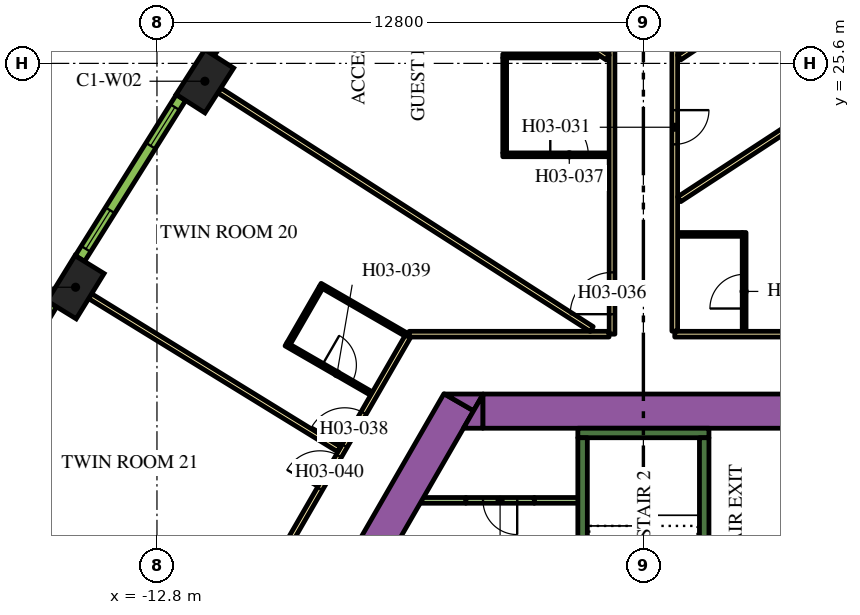
"""IFC4 building model, lengths in metres.
Left out: names, types, materials, properties, quantities, classifications, styles, units other than length and angle.
Written with IfcOpenShell. Run it as: python <this file> out.ifc"""

import sys

from ifc_helpers import new_model, si_unit, direction, frame, frame_2d, origin, origin_2d, place, context, subcontext, project, spatial, polyline, rectangle, outline, extrude, element, fill, save


model = new_model("IFC4")
c1 = context("Model", 3, precision=1e-05, world=origin(), true_north=direction((0.0, 1.0)))
c2 = subcontext(c1, "Body", "Model", "MODEL_VIEW")
j1 = project(units=[si_unit("LENGTHUNIT", "METRE"), si_unit("PLANEANGLEUNIT", "RADIAN")], contexts=[c1])
p1 = place(None, origin())
s1 = spatial("IfcSite", under=j1, at=p1, CompositionType="ELEMENT")
p2 = place(p1, origin())
s2 = spatial("IfcBuilding", under=s1, at=p2, CompositionType="ELEMENT")
p3 = place(p2, frame((0.0, 0.0, 54.9)))
s3 = spatial("IfcBuildingStorey", under=s2, at=p3, CompositionType="ELEMENT", Elevation=54.9)
for number, where, z_axis, x_axis in (
    (1, (-11.539, 25.131, 0.0), (0.0, 0.0, 1.0), (-0.539, -0.842, 0.0)),
    (2, (-14.942, 19.71, 0.0), (0.0, 0.0, 1.0), (-0.524, -0.852, 0.0)),
):
    element("IfcColumn", number, at=place(p3, frame(where, z_axis=z_axis, x_axis=x_axis)), inside=s3, PredefinedType="COLUMN", context=c2, shape_type="SweptSolid", body=[
        extrude(rectangle(XDim=1.4, YDim=0.9, at=origin_2d()), origin(), (0.0, 0.0, 1.0), 3.9),
    ])
p4 = place(p3, frame((-14.268, 0.387, 0.0), z_axis=(0.0, 0.0, 1.0), x_axis=(0.499994617707, 0.866028511231, 0.0)))
e3 = element("IfcWall", 3, at=p4, inside=s3, PredefinedType="SOLIDWALL", context=c2, shape_type="SweptSolid", body=[
    extrude(rectangle(XDim=18.817, YDim=0.9, at=frame_2d((9.409, 0.0))), origin(), (0.0, 0.0, 1.0), 3.9),
])
p5 = place(p3, origin())
e4 = element("IfcWall", 4, at=p5, inside=s3, PredefinedType="SOLIDWALL", context=c2, shape_type="SweptSolid", body=[
    extrude(outline(polyline([(-4.215, 16.9), (-4.469, 16.46), (-5.231, 16.9), (-4.215, 16.9)])), origin(), (0.0, 0.0, 1.0), 3.9),
])
p6 = place(p3, frame((-4.224, 16.45, 0.0), z_axis=(0.0, 0.0, 1.0), x_axis=(1.0, 0.0, 0.0)))
e5 = element("IfcWall", 5, at=p6, inside=s3, PredefinedType="SOLIDWALL", context=c2, shape_type="SweptSolid", body=[
    extrude(rectangle(XDim=9.488, YDim=0.9, at=frame_2d((4.744, 0.0))), origin(), (0.0, 0.0, 1.0), 3.9),
])
e6 = element("IfcWall", 6, at=p5, inside=s3, PredefinedType="SOLIDWALL", context=c2, shape_type="SweptSolid", body=[
    extrude(outline(polyline([(-4.734, 16.0), (-4.226, 16.88), (-4.226, 16.0), (-4.734, 16.0)])), origin(), (0.0, 0.0, 1.0), 3.9),
])
p7 = place(p3, frame((-1.725, 15.875, 0.0), z_axis=(0.0, 0.0, 1.0), x_axis=(1.0, 0.0, 0.0)))
e7 = element("IfcWall", 7, at=p7, inside=s3, PredefinedType="SOLIDWALL", context=c2, shape_type="SweptSolid", body=[
    extrude(rectangle(XDim=3.45, YDim=0.25, at=frame_2d((1.725, 0.0))), origin(), (0.0, 0.0, 1.0), 3.9),
])
p8 = place(p3, frame((1.6, 8.95, 0.0), z_axis=(0.0, 0.0, 1.0), x_axis=(0.0, 1.0, 0.0)))
e8 = element("IfcWall", 8, at=p8, inside=s3, PredefinedType="SOLIDWALL", context=c2, shape_type="SweptSolid", body=[
    extrude(rectangle(XDim=6.8, YDim=0.25, at=frame_2d((3.4, 0.0))), origin(), (0.0, 0.0, 1.0), 3.9),
])
p9 = place(p3, frame((-1.6, 8.7, 0.0), z_axis=(0.0, 0.0, 1.0), x_axis=(0.0, 1.0, 0.0)))
e9 = element("IfcWall", 9, at=p9, inside=s3, PredefinedType="SOLIDWALL", context=c2, shape_type="SweptSolid", body=[
    extrude(rectangle(XDim=7.05, YDim=0.25, at=frame_2d((3.525, 0.0))), origin(), (0.0, 0.0, 1.0), 3.9),
])
p10 = place(p3, frame((-5.851, 14.102, 0.0), z_axis=(0.0, 0.0, 1.0), x_axis=(1.0, 0.0, 0.0)))
e10 = element("IfcWall", 10, at=p10, inside=s3, PredefinedType="PARTITIONING", context=c2, shape_type="SweptSolid", body=[
    extrude(rectangle(XDim=1.18, YDim=0.15, at=frame_2d((0.59, 0.0))), origin(), (0.0, 0.0, 1.0), 2.75),
])
p11 = place(p3, frame((-2.871, 14.102, 0.0), z_axis=(0.0, 0.0, 1.0), x_axis=(1.0, 0.0, 0.0)))
e11 = element("IfcWall", 11, at=p11, inside=s3, PredefinedType="PARTITIONING", context=c2, shape_type="SweptSolid", body=[
    extrude(rectangle(XDim=1.196, YDim=0.15, at=frame_2d((0.598, 0.0))), origin(), (0.0, 0.0, 1.0), 2.75),
])
p12 = place(p3, frame((-2.871, 14.102, 0.0), z_axis=(0.0, 0.0, 1.0), x_axis=(-1.0, 0.0, 0.0)))
e12 = element("IfcWall", 12, at=p12, inside=s3, PredefinedType="PARTITIONING", context=c2, shape_type="SweptSolid", body=[
    extrude(rectangle(XDim=1.8, YDim=0.15, at=frame_2d((0.9, 0.0))), origin(), (0.0, 0.0, 1.0), 2.75),
])
p13 = place(p12, frame((0.45, 0.0, 0.0)))
e13 = element("IfcOpeningElement", 13, at=p13, cuts=e12, PredefinedType="OPENING", context=c2, shape_type="SweptSolid", body=[
    extrude(rectangle(XDim=0.9, YDim=2.1, at=frame_2d((0.45, 1.05))), frame((0.0, 0.085, 0.0), z_axis=(0.0, -1.0, 0.0), x_axis=(1.0, 0.0, 0.0)), (0.0, 0.0, 1.0), 0.17),
])
p14 = place(p3, frame((0.825, 18.475, 0.0), z_axis=(0.0, 0.0, 1.0), x_axis=(1.0, 0.0, 0.0)))
e14 = element("IfcWall", 14, at=p14, inside=s3, PredefinedType="PARTITIONING", context=c2, shape_type="SweptSolid", body=[
    extrude(rectangle(XDim=5.268, YDim=0.15, at=frame_2d((2.634, 0.0))), origin(), (0.0, 0.0, 1.0), 2.75),
])
p15 = place(p14, frame((4.088, 0.0, 0.0)))
e15 = element("IfcOpeningElement", 15, at=p15, cuts=e14, PredefinedType="OPENING", context=c2, shape_type="SweptSolid", body=[
    extrude(rectangle(XDim=1.0, YDim=2.1, at=frame_2d((0.5, 1.05))), frame((0.0, 0.085, 0.0), z_axis=(0.0, -1.0, 0.0), x_axis=(1.0, 0.0, 0.0)), (0.0, 0.0, 1.0), 0.17),
])
p16 = place(p3, frame((0.825, 34.699, 0.0), z_axis=(0.0, 0.0, 1.0), x_axis=(0.0, -1.0, 0.0)))
e16 = element("IfcWall", 16, at=p16, inside=s3, PredefinedType="PARTITIONING", context=c2, shape_type="SweptSolid", body=[
    extrude(rectangle(XDim=16.144, YDim=0.15, at=frame_2d((8.072, 0.0))), origin(), (0.0, 0.0, 1.0), 2.75),
])
p17 = place(p16, frame((10.329, 0.0, 0.0)))
e17 = element("IfcOpeningElement", 17, at=p17, cuts=e16, PredefinedType="OPENING", context=c2, shape_type="SweptSolid", body=[
    extrude(rectangle(XDim=0.9, YDim=2.1, at=frame_2d((0.45, 1.05))), frame((0.0, 0.085, 0.0), z_axis=(0.0, -1.0, 0.0), x_axis=(1.0, 0.0, 0.0)), (0.0, 0.0, 1.0), 0.17),
])
p18 = place(p16, frame((7.275, 0.0, 0.0)))
e18 = element("IfcOpeningElement", 18, at=p18, cuts=e16, PredefinedType="OPENING", context=c2, shape_type="SweptSolid", body=[
    extrude(rectangle(XDim=1.0, YDim=2.1, at=frame_2d((0.5, 1.05))), frame((0.0, 0.085, 0.0), z_axis=(0.0, -1.0, 0.0), x_axis=(1.0, 0.0, 0.0)), (0.0, 0.0, 1.0), 0.17),
])
p19 = place(p3, frame((-0.825, 18.475, 0.0), z_axis=(0.0, 0.0, 1.0), x_axis=(0.0, 1.0, 0.0)))
e19 = element("IfcWall", 19, at=p19, inside=s3, PredefinedType="PARTITIONING", context=c2, shape_type="SweptSolid", body=[
    extrude(rectangle(XDim=16.224, YDim=0.15, at=frame_2d((8.112, 0.0))), origin(), (0.0, 0.0, 1.0), 2.75),
])
p20 = place(p19, frame((7.949, 0.0, 0.0)))
e20 = element("IfcOpeningElement", 20, at=p20, cuts=e19, PredefinedType="OPENING", context=c2, shape_type="SweptSolid", body=[
    extrude(rectangle(XDim=1.0, YDim=2.1, at=frame_2d((0.5, 1.05))), frame((0.0, 0.085, 0.0), z_axis=(0.0, -1.0, 0.0), x_axis=(1.0, 0.0, 0.0)), (0.0, 0.0, 1.0), 0.17),
])
p21 = place(p19, frame((0.526, 0.0, 0.0)))
e21 = element("IfcOpeningElement", 21, at=p21, cuts=e19, PredefinedType="OPENING", context=c2, shape_type="SweptSolid", body=[
    extrude(rectangle(XDim=1.1, YDim=2.1, at=frame_2d((0.55, 1.05))), frame((0.0, 0.085, 0.0), z_axis=(0.0, -1.0, 0.0), x_axis=(1.0, 0.0, 0.0)), (0.0, 0.0, 1.0), 0.17),
])
p22 = place(p3, frame((-6.163, 18.475, 0.0), z_axis=(0.0, 0.0, 1.0), x_axis=(1.0, 0.0, 0.0)))
e22 = element("IfcWall", 22, at=p22, inside=s3, PredefinedType="PARTITIONING", context=c2, shape_type="SweptSolid", body=[
    extrude(rectangle(XDim=5.258, YDim=0.15, at=frame_2d((2.629, 0.0))), origin(), (0.0, 0.0, 1.0), 2.75),
])
p23 = place(p3, frame((-19.081, -3.9, 0.0), z_axis=(0.0, 0.0, 1.0), x_axis=(0.499998313975, 0.866026377209, 0.0)))
e23 = element("IfcWall", 23, at=p23, inside=s3, PredefinedType="PARTITIONING", context=c2, shape_type="SweptSolid", body=[
    extrude(rectangle(XDim=25.766, YDim=0.15, at=frame_2d((12.883, 0.0))), origin(), (0.0, 0.0, 1.0), 2.75),
])
p24 = place(p23, frame((22.445, 0.0, 0.0)))
e24 = element("IfcOpeningElement", 24, at=p24, cuts=e23, PredefinedType="OPENING", context=c2, shape_type="SweptSolid", body=[
    extrude(rectangle(XDim=1.0, YDim=2.1, at=frame_2d((0.5, 1.05))), frame((0.0, 0.085, 0.0), z_axis=(0.0, -1.0, 0.0), x_axis=(1.0, 0.0, 0.0)), (0.0, 0.0, 1.0), 0.17),
])
p25 = place(p23, frame((21.138, 0.0, 0.0)))
e25 = element("IfcOpeningElement", 25, at=p25, cuts=e23, PredefinedType="OPENING", context=c2, shape_type="SweptSolid", body=[
    extrude(rectangle(XDim=1.0, YDim=2.1, at=frame_2d((0.5, 1.05))), frame((0.0, 0.085, 0.0), z_axis=(0.0, -1.0, 0.0), x_axis=(1.0, 0.0, 0.0)), (0.0, 0.0, 1.0), 0.17),
])
p26 = place(p23, frame((14.066, 0.0, 0.0)))
e26 = element("IfcOpeningElement", 26, at=p26, cuts=e23, PredefinedType="OPENING", context=c2, shape_type="SweptSolid", body=[
    extrude(rectangle(XDim=0.9, YDim=2.1, at=frame_2d((0.45, 1.05))), frame((0.0, 0.085, 0.0), z_axis=(0.0, -1.0, 0.0), x_axis=(1.0, 0.0, 0.0)), (0.0, 0.0, 1.0), 0.17),
])
p27 = place(p23, frame((11.693, 0.0, 0.0)))
e27 = element("IfcOpeningElement", 27, at=p27, cuts=e23, PredefinedType="OPENING", context=c2, shape_type="SweptSolid", body=[
    extrude(rectangle(XDim=1.0, YDim=2.1, at=frame_2d((0.5, 1.05))), frame((0.0, 0.085, 0.0), z_axis=(0.0, -1.0, 0.0), x_axis=(1.0, 0.0, 0.0)), (0.0, 0.0, 1.0), 0.17),
])
p28 = place(p3, frame((-17.856, 13.999, 0.0), z_axis=(0.0, 0.0, 1.0), x_axis=(0.861371519381, -0.507975497047, 0.0)))
e28 = element("IfcWall", 28, at=p28, inside=s3, PredefinedType="PARTITIONING", context=c2, shape_type="SweptSolid", body=[
    extrude(rectangle(XDim=7.804, YDim=0.15, at=frame_2d((3.902, 0.0))), origin(), (0.0, 0.0, 1.0), 2.75),
])
p29 = place(p3, frame((-14.558, 19.475, 0.0), z_axis=(0.0, 0.0, 1.0), x_axis=(0.851829455142, -0.523819223925, 0.0)))
e29 = element("IfcWall", 29, at=p29, inside=s3, PredefinedType="PARTITIONING", context=c2, shape_type="SweptSolid", body=[
    extrude(rectangle(XDim=7.688, YDim=0.15, at=frame_2d((3.844, 0.0))), origin(), (0.0, 0.0, 1.0), 2.75),
])
p30 = place(p3, frame((-11.16, 24.888, 0.0), z_axis=(0.0, 0.0, 1.0), x_axis=(0.84199813156, -0.539480441211, 0.0)))
e30 = element("IfcWall", 30, at=p30, inside=s3, PredefinedType="PARTITIONING", context=c2, shape_type="SweptSolid", body=[
    extrude(rectangle(XDim=11.638, YDim=0.15, at=frame_2d((5.819, 0.0))), origin(), (0.0, 0.0, 1.0), 2.75),
])
p31 = place(p3, frame((-7.662, 30.238, 0.0), z_axis=(0.0, 0.0, 1.0), x_axis=(0.831882886825, -0.554951225431, 0.0)))
e31 = element("IfcWall", 31, at=p31, inside=s3, PredefinedType="PARTITIONING", context=c2, shape_type="SweptSolid", body=[
    extrude(rectangle(XDim=8.079, YDim=0.15, at=frame_2d((4.04, 0.0))), origin(), (0.0, 0.0, 1.0), 2.75),
])
p32 = place(p3, frame((9.922, 27.896, 0.0), z_axis=(0.0, 0.0, 1.0), x_axis=(-0.836970816595, -0.547247523675, 0.0)))
e32 = element("IfcWall", 32, at=p32, inside=s3, PredefinedType="PARTITIONING", context=c2, shape_type="SweptSolid", body=[
    extrude(rectangle(XDim=10.729, YDim=0.15, at=frame_2d((5.364, 0.0))), origin(), (0.0, 0.0, 1.0), 2.75),
])
p33 = place(p3, frame((7.662, 30.238, 0.0), z_axis=(0.0, 0.0, 1.0), x_axis=(-0.831882886825, -0.554951225431, 0.0)))
e33 = element("IfcWall", 33, at=p33, inside=s3, PredefinedType="PARTITIONING", context=c2, shape_type="SweptSolid", body=[
    extrude(rectangle(XDim=8.079, YDim=0.15, at=frame_2d((4.04, 0.0))), origin(), (0.0, 0.0, 1.0), 2.75),
])
p34 = place(p3, frame((2.651, 18.55, 0.0), z_axis=(0.0, 0.0, 1.0), x_axis=(0.0, 1.0, 0.0)))
e34 = element("IfcWall", 34, at=p34, inside=s3, PredefinedType="PARTITIONING", context=c2, shape_type="SweptSolid", body=[
    extrude(rectangle(XDim=2.6, YDim=0.1, at=frame_2d((1.3, 0.0))), origin(), (0.0, 0.0, 1.0), 2.75),
])
p35 = place(p34, frame((0.6, 0.0, 0.0)))
e35 = element("IfcOpeningElement", 35, at=p35, cuts=e34, PredefinedType="OPENING", context=c2, shape_type="SweptSolid", body=[
    extrude(rectangle(XDim=0.9, YDim=2.1, at=frame_2d((0.45, 1.05))), frame((0.0, 0.06, 0.0), z_axis=(0.0, -1.0, 0.0), x_axis=(1.0, 0.0, 0.0)), (0.0, 0.0, 1.0), 0.12),
])
p36 = place(p3, frame((2.601, 21.1, 0.0), z_axis=(0.0, 0.0, 1.0), x_axis=(-1.0, 0.0, 0.0)))
e36 = element("IfcWall", 36, at=p36, inside=s3, PredefinedType="PARTITIONING", context=c2, shape_type="SweptSolid", body=[
    extrude(rectangle(XDim=1.7, YDim=0.1, at=frame_2d((0.85, 0.0))), origin(), (0.0, 0.0, 1.0), 2.75),
])
p37 = place(p3, frame((-3.7, 23.195, 0.0), z_axis=(0.0, 0.0, 1.0), x_axis=(1.0, 0.0, 0.0)))
e37 = element("IfcWall", 37, at=p37, inside=s3, PredefinedType="PARTITIONING", context=c2, shape_type="SweptSolid", body=[
    extrude(rectangle(XDim=2.8, YDim=0.1, at=frame_2d((1.4, 0.0))), origin(), (0.0, 0.0, 1.0), 2.75),
])
p38 = place(p37, frame((1.25, 0.0, 0.0)))
e38 = element("IfcOpeningElement", 38, at=p38, cuts=e37, PredefinedType="OPENING", context=c2, shape_type="SweptSolid", body=[
    extrude(rectangle(XDim=1.0, YDim=2.1, at=frame_2d((0.5, 1.05))), frame((0.0, 0.06, 0.0), z_axis=(0.0, -1.0, 0.0), x_axis=(1.0, 0.0, 0.0)), (0.0, 0.0, 1.0), 0.12),
])
p39 = place(p3, frame((-3.65, 23.245, 0.0), z_axis=(0.0, 0.0, 1.0), x_axis=(0.0, 1.0, 0.0)))
e39 = element("IfcWall", 39, at=p39, inside=s3, PredefinedType="PARTITIONING", context=c2, shape_type="SweptSolid", body=[
    extrude(rectangle(XDim=2.5, YDim=0.1, at=frame_2d((1.25, 0.0))), origin(), (0.0, 0.0, 1.0), 2.75),
])
p40 = place(p3, frame((-1.21, 25.795, 0.0), z_axis=(0.0, 0.0, 1.0), x_axis=(-1.0, 0.0, 0.0)))
e40 = element("IfcWall", 40, at=p40, inside=s3, PredefinedType="PARTITIONING", context=c2, shape_type="SweptSolid", body=[
    extrude(rectangle(XDim=2.49, YDim=0.1, at=frame_2d((1.245, 0.0))), origin(), (0.0, 0.0, 1.0), 2.75),
])
p41 = place(p3, frame((-9.405, 18.21, 0.0), z_axis=(0.0, 0.0, 1.0), x_axis=(0.865997922154, -0.500047596559, 0.0)))
e41 = element("IfcWall", 41, at=p41, inside=s3, PredefinedType="PARTITIONING", context=c2, shape_type="SweptSolid", body=[
    extrude(rectangle(XDim=2.6, YDim=0.1, at=frame_2d((1.3, 0.0))), origin(), (0.0, 0.0, 1.0), 2.75),
])
p42 = place(p41, frame((1.1, 0.0, 0.0)))
e42 = element("IfcOpeningElement", 42, at=p42, cuts=e41, PredefinedType="OPENING", context=c2, shape_type="SweptSolid", body=[
    extrude(rectangle(XDim=0.9, YDim=2.1, at=frame_2d((0.45, 1.05))), frame((0.0, 0.06, 0.0), z_axis=(0.0, -1.0, 0.0), x_axis=(1.0, 0.0, 0.0)), (0.0, 0.0, 1.0), 0.12),
])
p43 = place(p3, frame((-9.336, 18.229, 0.0), z_axis=(0.0, 0.0, 1.0), x_axis=(0.499954529098, 0.86605165483, 0.0)))
e43 = element("IfcWall", 43, at=p43, inside=s3, PredefinedType="PARTITIONING", context=c2, shape_type="SweptSolid", body=[
    extrude(rectangle(XDim=1.7, YDim=0.1, at=frame_2d((0.85, 0.0))), origin(), (0.0, 0.0, 1.0), 2.75),
])
p44 = place(p3, frame((-6.253, 18.469, 0.0), z_axis=(0.0, 0.0, 1.0), x_axis=(-0.866021400173, 0.500006934395, 0.0)))
e44 = element("IfcWall", 44, at=p44, inside=s3, PredefinedType="PARTITIONING", context=c2, shape_type="SweptSolid", body=[
    extrude(rectangle(XDim=2.6, YDim=0.1, at=frame_2d((1.3, 0.0))), origin(), (0.0, 0.0, 1.0), 2.75),
])
p45 = place(p3, frame((-8.676, 30.068, 0.0), z_axis=(0.0, 0.0, 1.0), x_axis=(-0.547204617628, -0.836998868845, 0.0)))
e45 = element("IfcWall", 45, at=p45, inside=s3, PredefinedType="SOLIDWALL", context=c2, shape_type="SweptSolid", body=[
    extrude(rectangle(XDim=4.998, YDim=0.29, at=frame_2d((2.499, 0.0))), origin(), (0.0, 0.0, 1.0), 3.65),
])
p46 = place(p45, frame((0.297, 0.0, 0.9)))
e46 = element("IfcOpeningElement", 46, at=p46, cuts=e45, PredefinedType="OPENING", context=c2, shape_type="SweptSolid", body=[
    extrude(rectangle(XDim=1.2, YDim=2.15, at=frame_2d((0.6, 1.075))), frame((0.0, 0.155, 0.0), z_axis=(0.0, -1.0, 0.0), x_axis=(1.0, 0.0, 0.0)), (0.0, 0.0, 1.0), 0.31),
])
p47 = place(p45, frame((3.501, 0.0, 0.9)))
e47 = element("IfcOpeningElement", 47, at=p47, cuts=e45, PredefinedType="OPENING", context=c2, shape_type="SweptSolid", body=[
    extrude(rectangle(XDim=1.2, YDim=2.15, at=frame_2d((0.6, 1.075))), frame((0.0, 0.155, 0.0), z_axis=(0.0, -1.0, 0.0), x_axis=(1.0, 0.0, 0.0)), (0.0, 0.0, 1.0), 0.31),
])
p48 = place(p3, frame((-12.17, 24.699, 0.0), z_axis=(0.0, 0.0, 1.0), x_axis=(-0.531688286542, -0.846940119462, 0.0)))
e48 = element("IfcWall", 48, at=p48, inside=s3, PredefinedType="SOLIDWALL", context=c2, shape_type="SweptSolid", body=[
    extrude(rectangle(XDim=4.998, YDim=0.29, at=frame_2d((2.499, 0.0))), origin(), (0.0, 0.0, 1.0), 3.65),
])
p49 = place(p48, frame((0.297, 0.0, 0.9)))
e49 = element("IfcOpeningElement", 49, at=p49, cuts=e48, PredefinedType="OPENING", context=c2, shape_type="SweptSolid", body=[
    extrude(rectangle(XDim=1.2, YDim=2.15, at=frame_2d((0.6, 1.075))), frame((0.0, 0.155, 0.0), z_axis=(0.0, -1.0, 0.0), x_axis=(1.0, 0.0, 0.0)), (0.0, 0.0, 1.0), 0.31),
])
p50 = place(p48, frame((3.501, 0.0, 0.9)))
e50 = element("IfcOpeningElement", 50, at=p50, cuts=e48, PredefinedType="OPENING", context=c2, shape_type="SweptSolid", body=[
    extrude(rectangle(XDim=1.2, YDim=2.15, at=frame_2d((0.6, 1.075))), frame((0.0, 0.155, 0.0), z_axis=(0.0, -1.0, 0.0), x_axis=(1.0, 0.0, 0.0)), (0.0, 0.0, 1.0), 0.31),
])
p51 = place(p3, frame((-15.564, 19.267, 0.0), z_axis=(0.0, 0.0, 1.0), x_axis=(-0.515938796285, -0.856625448191, 0.0)))
e51 = element("IfcWall", 51, at=p51, inside=s3, PredefinedType="SOLIDWALL", context=c2, shape_type="SweptSolid", body=[
    extrude(rectangle(XDim=4.998, YDim=0.29, at=frame_2d((2.499, 0.0))), origin(), (0.0, 0.0, 1.0), 3.65),
])
p52 = place(p51, frame((0.297, 0.0, 0.9)))
e52 = element("IfcOpeningElement", 52, at=p52, cuts=e51, PredefinedType="OPENING", context=c2, shape_type="SweptSolid", body=[
    extrude(rectangle(XDim=1.2, YDim=2.15, at=frame_2d((0.6, 1.075))), frame((0.0, 0.155, 0.0), z_axis=(0.0, -1.0, 0.0), x_axis=(1.0, 0.0, 0.0)), (0.0, 0.0, 1.0), 0.31),
])
p53 = place(p51, frame((3.501, 0.0, 0.9)))
e53 = element("IfcOpeningElement", 53, at=p53, cuts=e51, PredefinedType="OPENING", context=c2, shape_type="SweptSolid", body=[
    extrude(rectangle(XDim=1.2, YDim=2.15, at=frame_2d((0.6, 1.075))), frame((0.0, 0.155, 0.0), z_axis=(0.0, -1.0, 0.0), x_axis=(1.0, 0.0, 0.0)), (0.0, 0.0, 1.0), 0.31),
])
p54 = place(p13, origin())
e54 = element("IfcDoor", 54, at=p54, inside=s3, OperationType="SINGLE_SWING_LEFT", PredefinedType="DOOR", context=c2, shape_type="SweptSolid", body=[
    extrude(rectangle(XDim=0.9, YDim=2.1, at=frame_2d((0.45, 1.05))), frame((0.0, 0.025, 0.0), z_axis=(0.0, -1.0, 0.0), x_axis=(1.0, 0.0, 0.0)), (0.0, 0.0, 1.0), 0.05),
])
fill(e13, e54)
p55 = place(p35, origin())
e55 = element("IfcDoor", 55, at=p55, inside=s3, OperationType="SINGLE_SWING_RIGHT", PredefinedType="DOOR", context=c2, shape_type="SweptSolid", body=[
    extrude(rectangle(XDim=0.9, YDim=2.1, at=frame_2d((0.45, 1.05))), frame((0.0, 0.025, 0.0), z_axis=(0.0, -1.0, 0.0), x_axis=(1.0, 0.0, 0.0)), (0.0, 0.0, 1.0), 0.05),
])
fill(e35, e55)
p56 = place(p17, origin())
e56 = element("IfcDoor", 56, at=p56, inside=s3, OperationType="SINGLE_SWING_RIGHT", PredefinedType="DOOR", context=c2, shape_type="SweptSolid", body=[
    extrude(rectangle(XDim=0.9, YDim=2.1, at=frame_2d((0.45, 1.05))), frame((0.0, 0.025, 0.0), z_axis=(0.0, -1.0, 0.0), x_axis=(1.0, 0.0, 0.0)), (0.0, 0.0, 1.0), 0.05),
])
fill(e17, e56)
p57 = place(p21, origin())
e57 = element("IfcDoor", 57, at=p57, inside=s3, OperationType="SINGLE_SWING_LEFT", PredefinedType="DOOR", context=c2, shape_type="SweptSolid", body=[
    extrude(rectangle(XDim=1.1, YDim=2.1, at=frame_2d((0.55, 1.05))), frame((0.0, 0.025, 0.0), z_axis=(0.0, -1.0, 0.0), x_axis=(1.0, 0.0, 0.0)), (0.0, 0.0, 1.0), 0.05),
])
fill(e21, e57)
p58 = place(p38, origin())
e58 = element("IfcDoor", 58, at=p58, inside=s3, OperationType="SINGLE_SWING_LEFT", PredefinedType="DOOR", context=c2, shape_type="SweptSolid", body=[
    extrude(rectangle(XDim=1.0, YDim=2.1, at=frame_2d((0.5, 1.05))), frame((0.0, 0.025, 0.0), z_axis=(0.0, -1.0, 0.0), x_axis=(1.0, 0.0, 0.0)), (0.0, 0.0, 1.0), 0.05),
])
fill(e38, e58)
p59 = place(p24, origin())
e59 = element("IfcDoor", 59, at=p59, inside=s3, OperationType="SINGLE_SWING_LEFT", PredefinedType="DOOR", context=c2, shape_type="SweptSolid", body=[
    extrude(rectangle(XDim=1.0, YDim=2.1, at=frame_2d((0.5, 1.05))), frame((0.0, 0.025, 0.0), z_axis=(0.0, -1.0, 0.0), x_axis=(1.0, 0.0, 0.0)), (0.0, 0.0, 1.0), 0.05),
])
fill(e24, e59)
p60 = place(p42, origin())
e60 = element("IfcDoor", 60, at=p60, inside=s3, OperationType="SINGLE_SWING_LEFT", PredefinedType="DOOR", context=c2, shape_type="SweptSolid", body=[
    extrude(rectangle(XDim=0.9, YDim=2.1, at=frame_2d((0.45, 1.05))), frame((0.0, 0.025, 0.0), z_axis=(0.0, -1.0, 0.0), x_axis=(1.0, 0.0, 0.0)), (0.0, 0.0, 1.0), 0.05),
])
fill(e42, e60)
p61 = place(p25, origin())
e61 = element("IfcDoor", 61, at=p61, inside=s3, OperationType="SINGLE_SWING_RIGHT", PredefinedType="DOOR", context=c2, shape_type="SweptSolid", body=[
    extrude(rectangle(XDim=1.0, YDim=2.1, at=frame_2d((0.5, 1.05))), frame((0.0, 0.025, 0.0), z_axis=(0.0, -1.0, 0.0), x_axis=(1.0, 0.0, 0.0)), (0.0, 0.0, 1.0), 0.05),
])
fill(e25, e61)
p62 = place(p49, origin())
e62 = element("IfcWindow", 62, at=p62, inside=s3, PartitioningType="DOUBLE_PANEL_VERTICAL", PredefinedType="WINDOW", context=c2, shape_type="SweptSolid", body=[
    extrude(rectangle(XDim=1.2, YDim=2.15, at=frame_2d((0.6, 1.075))), frame((0.0, 0.015, 0.0), z_axis=(0.0, -1.0, 0.0), x_axis=(1.0, 0.0, 0.0)), (0.0, 0.0, 1.0), 0.06),
])
fill(e49, e62)
p63 = place(p50, origin())
e63 = element("IfcWindow", 63, at=p63, inside=s3, PartitioningType="DOUBLE_PANEL_VERTICAL", PredefinedType="WINDOW", context=c2, shape_type="SweptSolid", body=[
    extrude(rectangle(XDim=1.2, YDim=2.15, at=frame_2d((0.6, 1.075))), frame((0.0, 0.015, 0.0), z_axis=(0.0, -1.0, 0.0), x_axis=(1.0, 0.0, 0.0)), (0.0, 0.0, 1.0), 0.06),
])
fill(e50, e63)
save(model, sys.argv[1])
